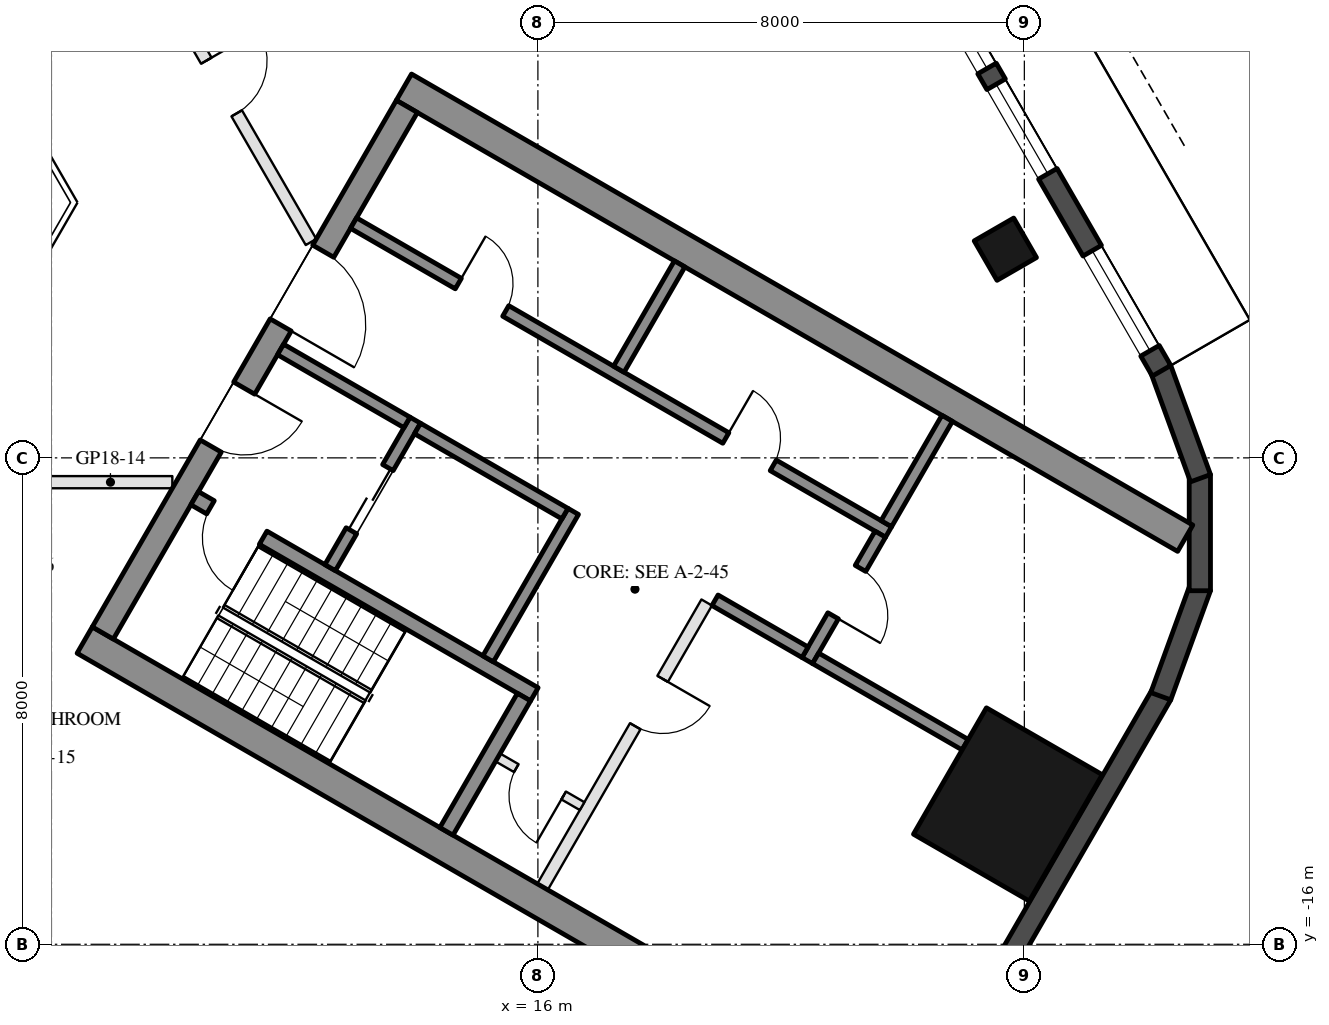
"""IFC4 building model, lengths in metres.
Left out: names, types, materials, properties, quantities, classifications, styles, units other than length and angle.
Written with IfcOpenShell. Run it as: python <this file> out.ifc"""

import sys

from ifc_helpers import new_model, si_unit, direction, frame, frame_2d, origin, origin_2d, place, context, subcontext, project, spatial, rectangle, hollow_rectangle, extrude, element, fill, save


model = new_model("IFC4")
c1 = context("Model", 3, precision=1e-05, world=origin(), true_north=direction((0.0, 1.0)))
c2 = subcontext(c1, "Body", "Model", "MODEL_VIEW")
j1 = project(units=[si_unit("LENGTHUNIT", "METRE"), si_unit("PLANEANGLEUNIT", "RADIAN")], contexts=[c1])
p1 = place(None, origin())
s1 = spatial("IfcSite", under=j1, at=p1, CompositionType="ELEMENT")
p2 = place(p1, origin())
s2 = spatial("IfcBuilding", under=s1, at=p2, CompositionType="ELEMENT")
p3 = place(p2, frame((0.0, 0.0, 194.7)))
s3 = spatial("IfcBuildingStorey", under=s2, at=p3, CompositionType="ELEMENT", Elevation=194.7)
p4 = place(p3, frame((23.688, -4.568, 0.0), z_axis=(0.0, 0.0, 1.0), x_axis=(-0.5, 0.866025403784, 0.0)))
e1 = element("IfcColumn", 1, at=p4, inside=s3, PredefinedType="COLUMN", context=c2, shape_type="SweptSolid", body=[
    extrude(hollow_rectangle(XDim=0.75, YDim=0.75, WallThickness=0.035, at=origin_2d()), origin(), (0.0, 0.0, 1.0), 3.7),
])
p5 = place(p3, frame((23.729, -13.7, 0.0), z_axis=(0.0, 0.0, 1.0), x_axis=(0.5, 0.866025403784, 0.0)))
e2 = element("IfcColumn", 2, at=p5, inside=s3, PredefinedType="COLUMN", context=c2, shape_type="SweptSolid", body=[
    extrude(hollow_rectangle(XDim=2.4, YDim=2.2, WallThickness=0.06, at=origin_2d()), origin(), (0.0, 0.0, 1.0), 3.7),
])
p6 = place(p3, frame((23.427, -16.792, 0.0), z_axis=(0.0, 0.0, 1.0), x_axis=(0.500018773155, 0.866014564827, 0.0)))
e3 = element("IfcWall", 3, at=p6, inside=s3, PredefinedType="SOLIDWALL", context=c2, shape_type="SweptSolid", body=[
    extrude(rectangle(XDim=5.658, YDim=0.35, at=frame_2d((2.829, 0.0))), origin(), (0.0, 0.0, 1.0), 3.55),
])
for number, where, z_axis, x_axis in (
    (4, (26.244, -11.92, 0.0), (0.0, 0.0, 1.0), (0.342, 0.94, 0.0)),
    (5, (26.886, -10.185, 0.0), (0.0, 0.0, 1.0), (0.0, 1.0, 0.0)),
    (6, (26.897, -8.335, 0.0), (0.0, 0.0, 1.0), (-0.342, 0.94, 0.0)),
):
    element("IfcWall", number, at=place(p3, frame(where, z_axis=z_axis, x_axis=x_axis)), inside=s3, PredefinedType="SOLIDWALL", context=c2, shape_type="SweptSolid", body=[
        extrude(rectangle(XDim=1.91, YDim=0.35, at=frame_2d((0.955, 0.0))), origin(), (0.0, 0.0, 1.0), 3.55),
    ])
p7 = place(p3, frame((26.257, -6.567, 0.0), z_axis=(0.0, 0.0, 1.0), x_axis=(-0.500023526245, 0.866011820475, 0.0)))
e7 = element("IfcWall", 7, at=p7, inside=s3, PredefinedType="SOLIDWALL", context=c2, shape_type="SweptSolid", body=[
    extrude(rectangle(XDim=11.816, YDim=0.35, at=frame_2d((5.908, 0.0))), origin(), (0.0, 0.0, 1.0), 3.55),
])
p8 = place(p7, frame((0.38, 0.0, 0.3)))
e8 = element("IfcOpeningElement", 8, at=p8, cuts=e7, PredefinedType="OPENING", context=c2, shape_type="SweptSolid", body=[
    extrude(rectangle(XDim=1.9, YDim=2.65, at=frame_2d((0.95, 1.325))), frame((0.0, 0.185, 0.0), z_axis=(0.0, -1.0, 0.0), x_axis=(1.0, 0.0, 0.0)), (0.0, 0.0, 1.0), 0.37),
])
p9 = place(p7, frame((7.791, 0.0, 0.0)))
e9 = element("IfcOpeningElement", 9, at=p9, cuts=e7, PredefinedType="OPENING", context=c2, shape_type="SweptSolid", body=[
    extrude(rectangle(XDim=2.4, YDim=2.4, at=frame_2d((1.2, 1.2))), frame((0.0, 0.185, 0.0), z_axis=(0.0, -1.0, 0.0), x_axis=(1.0, 0.0, 0.0)), (0.0, 0.0, 1.0), 0.37),
])
p10 = place(p7, frame((3.741, 0.0, 0.3)))
e10 = element("IfcOpeningElement", 10, at=p10, cuts=e7, PredefinedType="OPENING", context=c2, shape_type="SweptSolid", body=[
    extrude(rectangle(XDim=1.7, YDim=2.65, at=frame_2d((0.85, 1.325))), frame((0.0, 0.185, 0.0), z_axis=(0.0, -1.0, 0.0), x_axis=(1.0, 0.0, 0.0)), (0.0, 0.0, 1.0), 0.37),
])
p11 = place(p7, frame((5.741, 0.0, 0.3)))
e11 = element("IfcOpeningElement", 11, at=p11, cuts=e7, PredefinedType="OPENING", context=c2, shape_type="SweptSolid", body=[
    extrude(rectangle(XDim=1.7, YDim=2.65, at=frame_2d((0.85, 1.325))), frame((0.0, 0.185, 0.0), z_axis=(0.0, -1.0, 0.0), x_axis=(1.0, 0.0, 0.0)), (0.0, 0.0, 1.0), 0.37),
])
for number, where, z_axis, x_axis in (
    (12, (8.547, -10.997, 0.0), (0.0, 0.0, 1.0), (0.866, -0.5, 0.0)),
    (13, (13.797, -1.903, 0.0), (0.0, 0.0, 1.0), (0.866, -0.5, 0.0)),
):
    element("IfcWall", number, at=place(p3, frame(where, z_axis=z_axis, x_axis=x_axis)), inside=s3, PredefinedType="SHEAR", context=c2, shape_type="SweptSolid", body=[
        extrude(rectangle(XDim=14.837, YDim=0.5, at=frame_2d((7.418, 0.0))), origin(), (0.0, 0.0, 1.0), 3.5),
    ])
p12 = place(p3, frame((8.845, -10.88, 0.0), z_axis=(0.0, 0.0, 1.0), x_axis=(0.500004234368, 0.866022959057, 0.0)))
e14 = element("IfcWall", 14, at=p12, inside=s3, PredefinedType="SHEAR", context=c2, shape_type="SweptSolid", body=[
    extrude(rectangle(XDim=10.0, YDim=0.4, at=frame_2d((5.0, 0.0))), origin(), (0.0, 0.0, 1.0), 3.5),
])
p13 = place(p12, frame((3.55, 0.0, 0.0)))
e15 = element("IfcOpeningElement", 15, at=p13, cuts=e14, PredefinedType="OPENING", context=c2, shape_type="SweptSolid", body=[
    extrude(rectangle(XDim=1.1, YDim=2.1, at=frame_2d((0.55, 1.05))), frame((0.0, 0.21, 0.0), z_axis=(0.0, -1.0, 0.0), x_axis=(1.0, 0.0, 0.0)), (0.0, 0.0, 1.0), 0.42),
])
p14 = place(p12, frame((5.85, 0.0, 0.0)))
e16 = element("IfcOpeningElement", 16, at=p14, cuts=e14, PredefinedType="OPENING", context=c2, shape_type="SweptSolid", body=[
    extrude(rectangle(XDim=1.4, YDim=2.1, at=frame_2d((0.7, 1.05))), frame((0.0, 0.21, 0.0), z_axis=(0.0, -1.0, 0.0), x_axis=(1.0, 0.0, 0.0)), (0.0, 0.0, 1.0), 0.42),
])
p15 = place(p3, frame((10.356, -8.664, 0.0), z_axis=(0.0, 0.0, 1.0), x_axis=(0.866028629588, -0.499994412703, 0.0)))
e17 = element("IfcWall", 17, at=p15, inside=s3, PredefinedType="SHEAR", context=c2, shape_type="SweptSolid", body=[
    extrude(rectangle(XDim=6.45, YDim=0.25, at=frame_2d((3.225, 0.0))), origin(), (0.0, 0.0, 1.0), 3.5),
])
p16 = place(p15, frame((0.3, 0.0, 0.0)))
e18 = element("IfcOpeningElement", 18, at=p16, cuts=e17, PredefinedType="OPENING", context=c2, shape_type="SweptSolid", body=[
    extrude(rectangle(XDim=1.0, YDim=2.1, at=frame_2d((0.5, 1.05))), frame((0.0, 0.135, 0.0), z_axis=(0.0, -1.0, 0.0), x_axis=(1.0, 0.0, 0.0)), (0.0, 0.0, 1.0), 0.27),
])
p17 = place(p3, frame((14.496, -14.143, 0.0), z_axis=(0.0, 0.0, 1.0), x_axis=(0.500062241894, 0.865989465428, 0.0)))
e19 = element("IfcWall", 19, at=p17, inside=s3, PredefinedType="SHEAR", context=c2, shape_type="SweptSolid", body=[
    extrude(rectangle(XDim=2.55, YDim=0.25, at=frame_2d((1.275, 0.0))), origin(), (0.0, 0.0, 1.0), 3.5),
])
p18 = place(p3, frame((15.181, -11.305, 0.0), z_axis=(0.0, 0.0, 1.0), x_axis=(0.49994636267, 0.866056369097, 0.0)))
e20 = element("IfcWall", 20, at=p18, inside=s3, PredefinedType="SHEAR", context=c2, shape_type="SweptSolid", body=[
    extrude(rectangle(XDim=2.8, YDim=0.2, at=frame_2d((1.4, 0.0))), origin(), (0.0, 0.0, 1.0), 3.5),
])
p19 = place(p3, frame((12.583, -9.805, 0.0), z_axis=(0.0, 0.0, 1.0), x_axis=(0.49994636267, 0.866056369097, 0.0)))
e21 = element("IfcWall", 21, at=p19, inside=s3, PredefinedType="SHEAR", context=c2, shape_type="SweptSolid", body=[
    extrude(rectangle(XDim=2.8, YDim=0.2, at=frame_2d((1.4, 0.0))), origin(), (0.0, 0.0, 1.0), 3.5),
])
p20 = place(p19, frame((0.7, 0.0, 0.0)))
e22 = element("IfcOpeningElement", 22, at=p20, cuts=e21, PredefinedType="OPENING", context=c2, shape_type="SweptSolid", body=[
    extrude(rectangle(XDim=1.2, YDim=2.1, at=frame_2d((0.6, 1.05))), frame((0.0, 0.11, 0.0), z_axis=(0.0, -1.0, 0.0), x_axis=(1.0, 0.0, 0.0)), (0.0, 0.0, 1.0), 0.22),
])
p21 = place(p3, frame((11.768, -6.217, 0.0), z_axis=(0.0, 0.0, 1.0), x_axis=(0.866050077142, -0.499957262057, 0.0)))
e23 = element("IfcWall", 23, at=p21, inside=s3, PredefinedType="SHEAR", context=c2, shape_type="SweptSolid", body=[
    extrude(rectangle(XDim=2.4, YDim=0.2, at=frame_2d((1.2, 0.0))), origin(), (0.0, 0.0, 1.0), 3.5),
])
p22 = place(p3, frame((14.02, -7.517, 0.0), z_axis=(0.0, 0.0, 1.0), x_axis=(0.866034573852, -0.49998411664, 0.0)))
e24 = element("IfcWall", 24, at=p22, inside=s3, PredefinedType="SHEAR", context=c2, shape_type="SweptSolid", body=[
    extrude(rectangle(XDim=2.8, YDim=0.2, at=frame_2d((1.4, 0.0))), origin(), (0.0, 0.0, 1.0), 3.5),
])
p23 = place(p3, frame((12.968, -4.138, 0.0), z_axis=(0.0, 0.0, 1.0), x_axis=(0.866028328073, -0.49999493495, 0.0)))
e25 = element("IfcWall", 25, at=p23, inside=s3, PredefinedType="SHEAR", context=c2, shape_type="SweptSolid", body=[
    extrude(rectangle(XDim=10.16, YDim=0.2, at=frame_2d((5.08, 0.0))), origin(), (0.0, 0.0, 1.0), 3.5),
])
p24 = place(p23, frame((1.99, 0.0, 0.0)))
e26 = element("IfcOpeningElement", 26, at=p24, cuts=e25, PredefinedType="OPENING", context=c2, shape_type="SweptSolid", body=[
    extrude(rectangle(XDim=0.9, YDim=2.1, at=frame_2d((0.45, 1.05))), frame((0.0, 0.11, 0.0), z_axis=(0.0, -1.0, 0.0), x_axis=(1.0, 0.0, 0.0)), (0.0, 0.0, 1.0), 0.22),
])
p25 = place(p23, frame((7.07, 0.0, 0.0)))
e27 = element("IfcOpeningElement", 27, at=p25, cuts=e25, PredefinedType="OPENING", context=c2, shape_type="SweptSolid", body=[
    extrude(rectangle(XDim=0.9, YDim=2.1, at=frame_2d((0.45, 1.05))), frame((0.0, 0.11, 0.0), z_axis=(0.0, -1.0, 0.0), x_axis=(1.0, 0.0, 0.0)), (0.0, 0.0, 1.0), 0.22),
])
p26 = place(p3, frame((20.43, -11.333, 0.0), z_axis=(0.0, 0.0, 1.0), x_axis=(0.500001309137, 0.866024647952, 0.0)))
e28 = element("IfcWall", 28, at=p26, inside=s3, PredefinedType="SHEAR", context=c2, shape_type="SweptSolid", body=[
    extrude(rectangle(XDim=2.4, YDim=0.2, at=frame_2d((1.2, 0.0))), origin(), (0.0, 0.0, 1.0), 3.5),
])
p27 = place(p26, frame((0.85, 0.0, 0.0)))
e29 = element("IfcOpeningElement", 29, at=p27, cuts=e28, PredefinedType="OPENING", context=c2, shape_type="SweptSolid", body=[
    extrude(rectangle(XDim=0.9, YDim=2.1, at=frame_2d((0.45, 1.05))), frame((0.0, 0.11, 0.0), z_axis=(0.0, -1.0, 0.0), x_axis=(1.0, 0.0, 0.0)), (0.0, 0.0, 1.0), 0.22),
])
p28 = place(p3, frame((18.913, -10.342, 0.0), z_axis=(0.0, 0.0, 1.0), x_axis=(0.866038183914, -0.499977863513, 0.0)))
e30 = element("IfcWall", 30, at=p28, inside=s3, PredefinedType="SHEAR", context=c2, shape_type="SweptSolid", body=[
    extrude(rectangle(XDim=1.71, YDim=0.2, at=frame_2d((0.855, 0.0))), origin(), (0.0, 0.0, 1.0), 3.5),
])
for number, where, z_axis, x_axis in (
    (31, (17.331, -6.542, 0.0), (0.0, 0.0, 1.0), (0.5, 0.866, 0.0)),
    (32, (21.73, -9.082, 0.0), (0.0, 0.0, 1.0), (0.5, 0.866, 0.0)),
):
    element("IfcWall", number, at=place(p3, frame(where, z_axis=z_axis, x_axis=x_axis)), inside=s3, PredefinedType="SHEAR", context=c2, shape_type="SweptSolid", body=[
        extrude(rectangle(XDim=2.0, YDim=0.2, at=frame_2d((1.0, 0.0))), origin(), (0.0, 0.0, 1.0), 3.5),
    ])
p29 = place(p3, frame((20.567, -11.297, 0.0), z_axis=(0.0, 0.0, 1.0), x_axis=(0.866055327414, -0.49994816717, 0.0)))
e33 = element("IfcWall", 33, at=p29, inside=s3, PredefinedType="SHEAR", context=c2, shape_type="SweptSolid", body=[
    extrude(rectangle(XDim=2.84, YDim=0.2, at=frame_2d((1.42, 0.0))), origin(), (0.0, 0.0, 1.0), 3.5),
])
p30 = place(p3, frame((16.076, -15.055, 0.0), z_axis=(0.0, 0.0, 1.0), x_axis=(0.499995103361, 0.866028230842, 0.0)))
e34 = element("IfcWall", 34, at=p30, inside=s3, PredefinedType="PARTITIONING", context=c2, shape_type="SweptSolid", body=[
    extrude(rectangle(XDim=5.4, YDim=0.2, at=frame_2d((2.7, 0.0))), origin(), (0.0, 0.0, 1.0), 3.5),
])
p31 = place(p30, frame((3.05, 0.0, 0.0)))
e35 = element("IfcOpeningElement", 35, at=p31, cuts=e34, PredefinedType="OPENING", context=c2, shape_type="SweptSolid", body=[
    extrude(rectangle(XDim=0.9, YDim=2.1, at=frame_2d((0.45, 1.05))), frame((0.0, 0.11, 0.0), z_axis=(0.0, -1.0, 0.0), x_axis=(1.0, 0.0, 0.0)), (0.0, 0.0, 1.0), 0.22),
])
p32 = place(p3, frame((15.342, -12.928, 0.0), z_axis=(0.0, 0.0, 1.0), x_axis=(0.865989903783, -0.500061482766, 0.0)))
e36 = element("IfcWall", 36, at=p32, inside=s3, PredefinedType="PARTITIONING", context=c2, shape_type="SweptSolid", body=[
    extrude(rectangle(XDim=1.6, YDim=0.15, at=frame_2d((0.8, 0.0))), origin(), (0.0, 0.0, 1.0), 3.5),
])
p33 = place(p32, frame((0.35, 0.0, 0.0)))
e37 = element("IfcOpeningElement", 37, at=p33, cuts=e36, PredefinedType="OPENING", context=c2, shape_type="SweptSolid", body=[
    extrude(rectangle(XDim=0.9, YDim=2.1, at=frame_2d((0.45, 1.05))), frame((0.0, 0.085, 0.0), z_axis=(0.0, -1.0, 0.0), x_axis=(1.0, 0.0, 0.0)), (0.0, 0.0, 1.0), 0.17),
])
p34 = place(p3, frame((9.988, -8.4, 0.0), z_axis=(0.0, 0.0, 1.0), x_axis=(-1.0, 0.0, 0.0)))
e38 = element("IfcWall", 38, at=p34, inside=s3, PredefinedType="PARTITIONING", context=c2, shape_type="SweptSolid", body=[
    extrude(rectangle(XDim=5.088, YDim=0.2, at=frame_2d((2.544, 0.0))), origin(), (0.0, 0.0, 1.0), 2.95),
])
p35 = place(p34, frame((2.044, 0.0, 0.0)))
e39 = element("IfcOpeningElement", 39, at=p35, cuts=e38, PredefinedType="OPENING", context=c2, shape_type="SweptSolid", body=[
    extrude(rectangle(XDim=1.0, YDim=2.1, at=frame_2d((0.5, 1.05))), frame((0.0, 0.11, 0.0), z_axis=(0.0, -1.0, 0.0), x_axis=(1.0, 0.0, 0.0)), (0.0, 0.0, 1.0), 0.22),
])
p36 = place(p3, frame((9.325, 0.649, 0.0), z_axis=(0.0, 0.0, 1.0), x_axis=(0.500032331163, -0.866006736574, 0.0)))
e40 = element("IfcWall", 40, at=p36, inside=s3, PredefinedType="PARTITIONING", context=c2, shape_type="SweptSolid", body=[
    extrude(rectangle(XDim=5.888, YDim=0.2, at=frame_2d((2.944, 0.0))), origin(), (0.0, 0.0, 1.0), 2.95),
])
p37 = place(p36, frame((2.444, 0.0, 0.0)))
e41 = element("IfcOpeningElement", 41, at=p37, cuts=e40, PredefinedType="OPENING", context=c2, shape_type="SweptSolid", body=[
    extrude(rectangle(XDim=1.0, YDim=2.1, at=frame_2d((0.5, 1.05))), frame((0.0, 0.11, 0.0), z_axis=(0.0, -1.0, 0.0), x_axis=(1.0, 0.0, 0.0)), (0.0, 0.0, 1.0), 0.22),
])
p38 = place(p8, origin())
e42 = element("IfcWindow", 42, at=p38, inside=s3, PartitioningType="SINGLE_PANEL", PredefinedType="WINDOW", context=c2, shape_type="SweptSolid", body=[
    extrude(rectangle(XDim=1.9, YDim=2.65, at=frame_2d((0.95, 1.325))), frame((0.0, 0.03, 0.0), z_axis=(0.0, -1.0, 0.0), x_axis=(1.0, 0.0, 0.0)), (0.0, 0.0, 1.0), 0.06),
])
fill(e8, e42)
p39 = place(p10, origin())
e43 = element("IfcWindow", 43, at=p39, inside=s3, PartitioningType="SINGLE_PANEL", PredefinedType="WINDOW", context=c2, shape_type="SweptSolid", body=[
    extrude(rectangle(XDim=1.7, YDim=2.65, at=frame_2d((0.85, 1.325))), frame((0.0, 0.03, 0.0), z_axis=(0.0, -1.0, 0.0), x_axis=(1.0, 0.0, 0.0)), (0.0, 0.0, 1.0), 0.06),
])
fill(e10, e43)
p40 = place(p11, origin())
e44 = element("IfcWindow", 44, at=p40, inside=s3, PartitioningType="SINGLE_PANEL", PredefinedType="WINDOW", context=c2, shape_type="SweptSolid", body=[
    extrude(rectangle(XDim=1.7, YDim=2.65, at=frame_2d((0.85, 1.325))), frame((0.0, 0.03, 0.0), z_axis=(0.0, -1.0, 0.0), x_axis=(1.0, 0.0, 0.0)), (0.0, 0.0, 1.0), 0.06),
])
fill(e11, e44)
p41 = place(p20, origin())
e45 = element("IfcDoor", 45, at=p41, inside=s3, OperationType="DOUBLE_DOOR_SLIDING", PredefinedType="DOOR", context=c2, shape_type="SweptSolid", body=[
    extrude(rectangle(XDim=1.2, YDim=2.1, at=frame_2d((0.6, 1.05))), frame((0.0, 0.025, 0.0), z_axis=(0.0, -1.0, 0.0), x_axis=(1.0, 0.0, 0.0)), (0.0, 0.0, 1.0), 0.05),
])
fill(e22, e45)
p42 = place(p33, frame((0.9, 0.0, 0.0), z_axis=(0.0, 0.0, 1.0), x_axis=(-1.0, 0.0, 0.0)))
e46 = element("IfcDoor", 46, at=p42, inside=s3, OperationType="SINGLE_SWING_LEFT", PredefinedType="DOOR", context=c2, shape_type="SweptSolid", body=[
    extrude(rectangle(XDim=0.9, YDim=2.1, at=frame_2d((0.45, 1.05))), frame((0.0, 0.025, 0.0), z_axis=(0.0, -1.0, 0.0), x_axis=(1.0, 0.0, 0.0)), (0.0, 0.0, 1.0), 0.05),
])
fill(e37, e46)
p43 = place(p24, origin())
e47 = element("IfcDoor", 47, at=p43, inside=s3, OperationType="SINGLE_SWING_LEFT", PredefinedType="DOOR", context=c2, shape_type="SweptSolid", body=[
    extrude(rectangle(XDim=0.9, YDim=2.1, at=frame_2d((0.45, 1.05))), frame((0.0, 0.025, 0.0), z_axis=(0.0, -1.0, 0.0), x_axis=(1.0, 0.0, 0.0)), (0.0, 0.0, 1.0), 0.05),
])
fill(e26, e47)
p44 = place(p25, origin())
e48 = element("IfcDoor", 48, at=p44, inside=s3, OperationType="SINGLE_SWING_LEFT", PredefinedType="DOOR", context=c2, shape_type="SweptSolid", body=[
    extrude(rectangle(XDim=0.9, YDim=2.1, at=frame_2d((0.45, 1.05))), frame((0.0, 0.025, 0.0), z_axis=(0.0, -1.0, 0.0), x_axis=(1.0, 0.0, 0.0)), (0.0, 0.0, 1.0), 0.05),
])
fill(e27, e48)
p45 = place(p27, frame((0.9, 0.0, 0.0), z_axis=(0.0, 0.0, 1.0), x_axis=(-1.0, 0.0, 0.0)))
e49 = element("IfcDoor", 49, at=p45, inside=s3, OperationType="SINGLE_SWING_RIGHT", PredefinedType="DOOR", context=c2, shape_type="SweptSolid", body=[
    extrude(rectangle(XDim=0.9, YDim=2.1, at=frame_2d((0.45, 1.05))), frame((0.0, 0.025, 0.0), z_axis=(0.0, -1.0, 0.0), x_axis=(1.0, 0.0, 0.0)), (0.0, 0.0, 1.0), 0.05),
])
fill(e29, e49)
p46 = place(p31, frame((0.9, 0.0, 0.0), z_axis=(0.0, 0.0, 1.0), x_axis=(-1.0, 0.0, 0.0)))
e50 = element("IfcDoor", 50, at=p46, inside=s3, OperationType="SINGLE_SWING_LEFT", PredefinedType="DOOR", context=c2, shape_type="SweptSolid", body=[
    extrude(rectangle(XDim=0.9, YDim=2.1, at=frame_2d((0.45, 1.05))), frame((0.0, 0.025, 0.0), z_axis=(0.0, -1.0, 0.0), x_axis=(1.0, 0.0, 0.0)), (0.0, 0.0, 1.0), 0.05),
])
fill(e35, e50)
p47 = place(p13, frame((1.1, 0.0, 0.0), z_axis=(0.0, 0.0, 1.0), x_axis=(-1.0, 0.0, 0.0)))
e51 = element("IfcDoor", 51, at=p47, inside=s3, OperationType="SINGLE_SWING_LEFT", PredefinedType="DOOR", context=c2, shape_type="SweptSolid", body=[
    extrude(rectangle(XDim=1.1, YDim=2.1, at=frame_2d((0.55, 1.05))), frame((0.0, 0.025, 0.0), z_axis=(0.0, -1.0, 0.0), x_axis=(1.0, 0.0, 0.0)), (0.0, 0.0, 1.0), 0.05),
])
fill(e15, e51)
p48 = place(p14, frame((1.4, 0.0, 0.0), z_axis=(0.0, 0.0, 1.0), x_axis=(-1.0, 0.0, 0.0)))
e52 = element("IfcDoor", 52, at=p48, inside=s3, OperationType="DOUBLE_DOOR_SINGLE_SWING", PredefinedType="DOOR", context=c2, shape_type="SweptSolid", body=[
    extrude(rectangle(XDim=1.4, YDim=2.1, at=frame_2d((0.7, 1.05))), frame((0.0, 0.025, 0.0), z_axis=(0.0, -1.0, 0.0), x_axis=(1.0, 0.0, 0.0)), (0.0, 0.0, 1.0), 0.05),
])
fill(e16, e52)
p49 = place(p16, frame((1.0, 0.0, 0.0), z_axis=(0.0, 0.0, 1.0), x_axis=(-1.0, 0.0, 0.0)))
e53 = element("IfcDoor", 53, at=p49, inside=s3, OperationType="SINGLE_SWING_LEFT", PredefinedType="DOOR", context=c2, shape_type="SweptSolid", body=[
    extrude(rectangle(XDim=1.0, YDim=2.1, at=frame_2d((0.5, 1.05))), frame((0.0, 0.025, 0.0), z_axis=(0.0, -1.0, 0.0), x_axis=(1.0, 0.0, 0.0)), (0.0, 0.0, 1.0), 0.05),
])
fill(e18, e53)
p50 = place(p37, origin())
e54 = element("IfcDoor", 54, at=p50, inside=s3, OperationType="SINGLE_SWING_LEFT", PredefinedType="DOOR", context=c2, shape_type="SweptSolid", body=[
    extrude(rectangle(XDim=1.0, YDim=2.1, at=frame_2d((0.5, 1.05))), frame((0.0, 0.025, 0.0), z_axis=(0.0, -1.0, 0.0), x_axis=(1.0, 0.0, 0.0)), (0.0, 0.0, 1.0), 0.05),
])
fill(e41, e54)
save(model, sys.argv[1])
